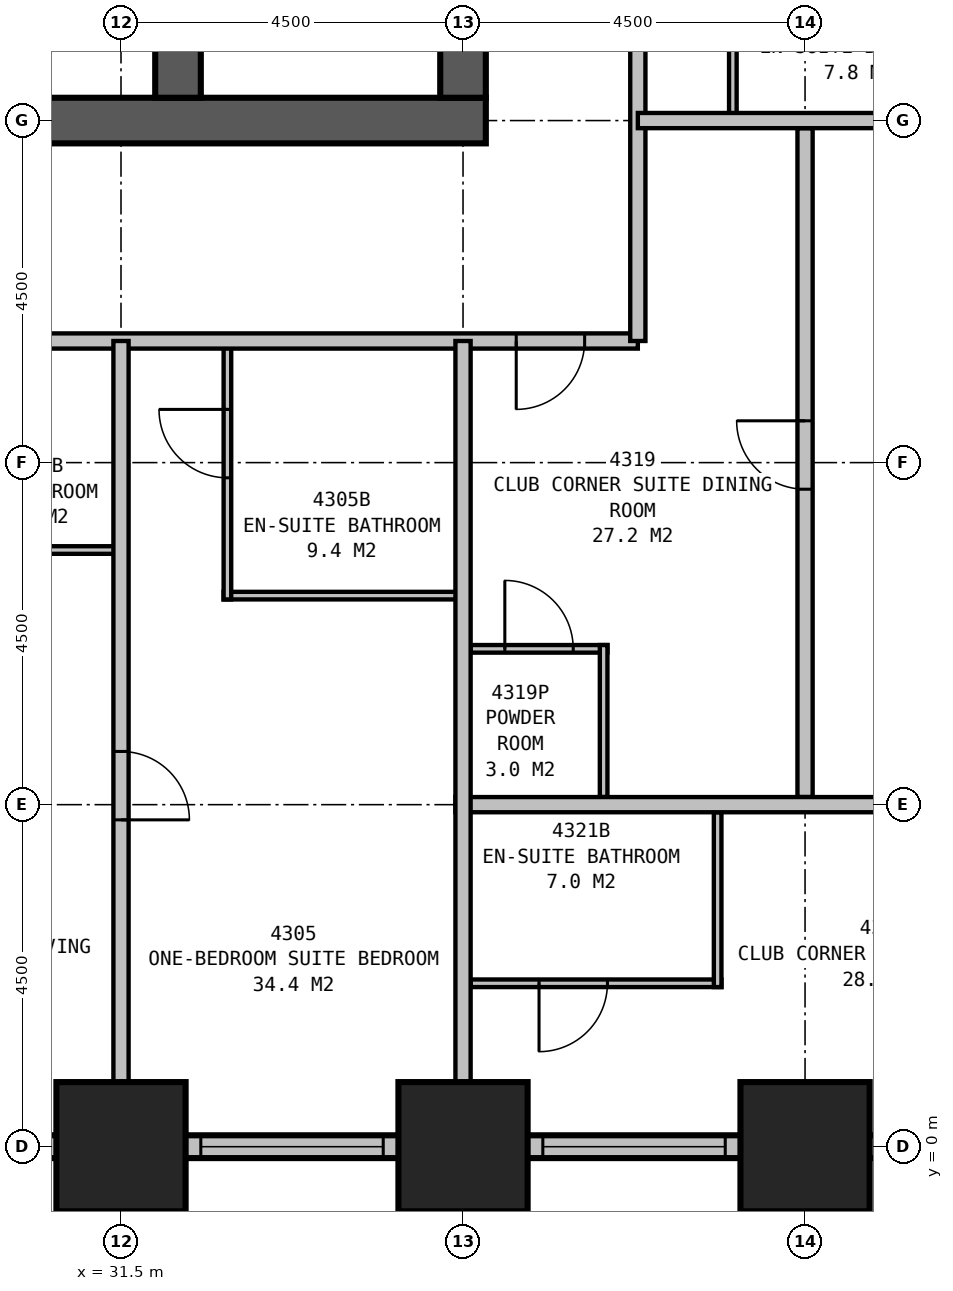
"""IFC4 building model, lengths in metres.
Left out: names, types, materials, properties, quantities, classifications, styles, units other than length and angle.
Written with IfcOpenShell. Run it as: python <this file> out.ifc"""

import sys

from ifc_helpers import new_model, si_unit, direction, frame, frame_2d, origin, origin_2d, place, context, subcontext, project, spatial, rectangle, extrude, element, fill, save


model = new_model("IFC4")
c1 = context("Model", 3, precision=1e-05, world=origin(), true_north=direction((0.0, 1.0)))
c2 = subcontext(c1, "Body", "Model", "MODEL_VIEW")
j1 = project(units=[si_unit("LENGTHUNIT", "METRE"), si_unit("PLANEANGLEUNIT", "RADIAN")], contexts=[c1])
p1 = place(None, origin())
s1 = spatial("IfcSite", under=j1, at=p1, CompositionType="ELEMENT")
p2 = place(p1, origin())
s2 = spatial("IfcBuilding", under=s1, at=p2, CompositionType="ELEMENT")
p3 = place(p2, frame((0.0, 0.0, 169.4)))
s3 = spatial("IfcBuildingStorey", under=s2, at=p3, CompositionType="ELEMENT", Elevation=169.4)
for number, where, z_axis, x_axis in (
    (1, (31.5, 0.0, 0.0), (0.0, 0.0, 1.0), (1.0, 0.0, 0.0)),
    (2, (36.0, 0.0, 0.0), (0.0, 0.0, 1.0), (1.0, 0.0, 0.0)),
    (3, (40.5, 0.0, 0.0), (0.0, 0.0, 1.0), (1.0, 0.0, 0.0)),
):
    element("IfcColumn", number, at=place(p3, frame(where, z_axis=z_axis, x_axis=x_axis)), inside=s3, PredefinedType="COLUMN", context=c2, shape_type="SweptSolid", body=[
        extrude(rectangle(XDim=1.7, YDim=1.7, at=origin_2d()), origin(), (0.0, 0.0, 1.0), 3.5),
    ])
p4 = place(p3, frame((13.2, 13.5, 0.0), z_axis=(0.0, 0.0, 1.0), x_axis=(1.0, 0.0, 0.0)))
e4 = element("IfcWall", 4, at=p4, inside=s3, PredefinedType="SHEAR", context=c2, shape_type="SweptSolid", body=[
    extrude(rectangle(XDim=23.1, YDim=0.6, at=frame_2d((11.55, 0.0))), origin(), (0.0, 0.0, 1.0), 3.5),
])
p5 = place(p3, frame((32.25, 13.8, 0.0), z_axis=(0.0, 0.0, 1.0), x_axis=(0.0, 1.0, 0.0)))
e5 = element("IfcWall", 5, at=p5, inside=s3, PredefinedType="SHEAR", context=c2, shape_type="SweptSolid", body=[
    extrude(rectangle(XDim=12.9, YDim=0.6, at=frame_2d((6.45, 0.0))), origin(), (0.0, 0.0, 1.0), 3.5),
])
p6 = place(p5, frame((5.05, 0.0, 0.0), z_axis=(0.0, 0.0, 1.0), x_axis=(-1.0, 0.0, 0.0)))
e6 = element("IfcOpeningElement", 6, at=p6, cuts=e5, PredefinedType="OPENING", context=c2, shape_type="SweptSolid", body=[
    extrude(rectangle(XDim=1.2, YDim=2.1, at=frame_2d((0.6, 1.05))), frame((0.0, 0.31, 0.0), z_axis=(0.0, -1.0, 0.0), x_axis=(1.0, 0.0, 0.0)), (0.0, 0.0, 1.0), 0.62),
])
p7 = place(p3, frame((36.0, 13.8, 0.0), z_axis=(0.0, 0.0, 1.0), x_axis=(0.0, 1.0, 0.0)))
e7 = element("IfcWall", 7, at=p7, inside=s3, PredefinedType="SHEAR", context=c2, shape_type="SweptSolid", body=[
    extrude(rectangle(XDim=2.7, YDim=0.6, at=frame_2d((1.35, 0.0))), origin(), (0.0, 0.0, 1.0), 3.5),
])
p8 = place(p3, frame((8.85, 0.0, 0.0), z_axis=(0.0, 0.0, 1.0), x_axis=(1.0, 0.0, 0.0)))
e8 = element("IfcWall", 8, at=p8, inside=s3, PredefinedType="STANDARD", context=c2, shape_type="SweptSolid", body=[
    extrude(rectangle(XDim=36.3, YDim=0.3, at=frame_2d((18.15, 0.0))), origin(), (0.0, 0.0, 1.0), 2.25),
])
p9 = place(p8, frame((1.2, 0.0, 0.5)))
e9 = element("IfcOpeningElement", 9, at=p9, cuts=e8, PredefinedType="OPENING", context=c2, shape_type="SweptSolid", body=[
    extrude(rectangle(XDim=2.4, YDim=1.6, at=frame_2d((1.2, 0.8))), frame((0.0, 0.16, 0.0), z_axis=(0.0, -1.0, 0.0), x_axis=(1.0, 0.0, 0.0)), (0.0, 0.0, 1.0), 0.32),
])
p10 = place(p8, frame((5.7, 0.0, 0.5)))
e10 = element("IfcOpeningElement", 10, at=p10, cuts=e8, PredefinedType="OPENING", context=c2, shape_type="SweptSolid", body=[
    extrude(rectangle(XDim=2.4, YDim=1.6, at=frame_2d((1.2, 0.8))), frame((0.0, 0.16, 0.0), z_axis=(0.0, -1.0, 0.0), x_axis=(1.0, 0.0, 0.0)), (0.0, 0.0, 1.0), 0.32),
])
p11 = place(p8, frame((10.2, 0.0, 0.5)))
e11 = element("IfcOpeningElement", 11, at=p11, cuts=e8, PredefinedType="OPENING", context=c2, shape_type="SweptSolid", body=[
    extrude(rectangle(XDim=2.4, YDim=1.6, at=frame_2d((1.2, 0.8))), frame((0.0, 0.16, 0.0), z_axis=(0.0, -1.0, 0.0), x_axis=(1.0, 0.0, 0.0)), (0.0, 0.0, 1.0), 0.32),
])
p12 = place(p8, frame((14.7, 0.0, 0.5)))
e12 = element("IfcOpeningElement", 12, at=p12, cuts=e8, PredefinedType="OPENING", context=c2, shape_type="SweptSolid", body=[
    extrude(rectangle(XDim=2.4, YDim=1.6, at=frame_2d((1.2, 0.8))), frame((0.0, 0.16, 0.0), z_axis=(0.0, -1.0, 0.0), x_axis=(1.0, 0.0, 0.0)), (0.0, 0.0, 1.0), 0.32),
])
p13 = place(p8, frame((19.2, 0.0, 0.5)))
e13 = element("IfcOpeningElement", 13, at=p13, cuts=e8, PredefinedType="OPENING", context=c2, shape_type="SweptSolid", body=[
    extrude(rectangle(XDim=2.4, YDim=1.6, at=frame_2d((1.2, 0.8))), frame((0.0, 0.16, 0.0), z_axis=(0.0, -1.0, 0.0), x_axis=(1.0, 0.0, 0.0)), (0.0, 0.0, 1.0), 0.32),
])
p14 = place(p8, frame((23.7, 0.0, 0.5)))
e14 = element("IfcOpeningElement", 14, at=p14, cuts=e8, PredefinedType="OPENING", context=c2, shape_type="SweptSolid", body=[
    extrude(rectangle(XDim=2.4, YDim=1.6, at=frame_2d((1.2, 0.8))), frame((0.0, 0.16, 0.0), z_axis=(0.0, -1.0, 0.0), x_axis=(1.0, 0.0, 0.0)), (0.0, 0.0, 1.0), 0.32),
])
p15 = place(p8, frame((28.2, 0.0, 0.5)))
e15 = element("IfcOpeningElement", 15, at=p15, cuts=e8, PredefinedType="OPENING", context=c2, shape_type="SweptSolid", body=[
    extrude(rectangle(XDim=2.4, YDim=1.6, at=frame_2d((1.2, 0.8))), frame((0.0, 0.16, 0.0), z_axis=(0.0, -1.0, 0.0), x_axis=(1.0, 0.0, 0.0)), (0.0, 0.0, 1.0), 0.32),
])
p16 = place(p8, frame((32.7, 0.0, 0.5)))
e16 = element("IfcOpeningElement", 16, at=p16, cuts=e8, PredefinedType="OPENING", context=c2, shape_type="SweptSolid", body=[
    extrude(rectangle(XDim=2.4, YDim=1.6, at=frame_2d((1.2, 0.8))), frame((0.0, 0.16, 0.0), z_axis=(0.0, -1.0, 0.0), x_axis=(1.0, 0.0, 0.0)), (0.0, 0.0, 1.0), 0.32),
])
p17 = place(p3, frame((11.2, 10.6, 0.0), z_axis=(0.0, 0.0, 1.0), x_axis=(1.0, 0.0, 0.0)))
e17 = element("IfcWall", 17, at=p17, inside=s3, PredefinedType="PARTITIONING", context=c2, shape_type="SweptSolid", body=[
    extrude(rectangle(XDim=27.1, YDim=0.2, at=frame_2d((13.55, 0.0))), origin(), (0.0, 0.0, 1.0), 3.25),
])
p18 = place(p17, frame((4.05, 0.0, 0.0), z_axis=(0.0, 0.0, 1.0), x_axis=(-1.0, 0.0, 0.0)))
e18 = element("IfcOpeningElement", 18, at=p18, cuts=e17, PredefinedType="OPENING", context=c2, shape_type="SweptSolid", body=[
    extrude(rectangle(XDim=0.9, YDim=2.1, at=frame_2d((0.45, 1.05))), frame((0.0, 0.11, 0.0), z_axis=(0.0, -1.0, 0.0), x_axis=(1.0, 0.0, 0.0)), (0.0, 0.0, 1.0), 0.22),
])
p19 = place(p17, frame((12.65, 0.0, 0.0), z_axis=(0.0, 0.0, 1.0), x_axis=(-1.0, 0.0, 0.0)))
e19 = element("IfcOpeningElement", 19, at=p19, cuts=e17, PredefinedType="OPENING", context=c2, shape_type="SweptSolid", body=[
    extrude(rectangle(XDim=1.0, YDim=2.1, at=frame_2d((0.5, 1.05))), frame((0.0, 0.11, 0.0), z_axis=(0.0, -1.0, 0.0), x_axis=(1.0, 0.0, 0.0)), (0.0, 0.0, 1.0), 0.22),
])
p20 = place(p17, frame((17.55, 0.0, 0.0), z_axis=(0.0, 0.0, 1.0), x_axis=(-1.0, 0.0, 0.0)))
e20 = element("IfcOpeningElement", 20, at=p20, cuts=e17, PredefinedType="OPENING", context=c2, shape_type="SweptSolid", body=[
    extrude(rectangle(XDim=0.9, YDim=2.1, at=frame_2d((0.45, 1.05))), frame((0.0, 0.11, 0.0), z_axis=(0.0, -1.0, 0.0), x_axis=(1.0, 0.0, 0.0)), (0.0, 0.0, 1.0), 0.22),
])
p21 = place(p17, frame((1.6, 0.0, 0.0), z_axis=(0.0, 0.0, 1.0), x_axis=(-1.0, 0.0, 0.0)))
e21 = element("IfcOpeningElement", 21, at=p21, cuts=e17, PredefinedType="OPENING", context=c2, shape_type="SweptSolid", body=[
    extrude(rectangle(XDim=0.9, YDim=2.1, at=frame_2d((0.45, 1.05))), frame((0.0, 0.11, 0.0), z_axis=(0.0, -1.0, 0.0), x_axis=(1.0, 0.0, 0.0)), (0.0, 0.0, 1.0), 0.22),
])
p22 = place(p17, frame((26.4, 0.0, 0.0), z_axis=(0.0, 0.0, 1.0), x_axis=(-1.0, 0.0, 0.0)))
e22 = element("IfcOpeningElement", 22, at=p22, cuts=e17, PredefinedType="OPENING", context=c2, shape_type="SweptSolid", body=[
    extrude(rectangle(XDim=0.9, YDim=2.1, at=frame_2d((0.45, 1.05))), frame((0.0, 0.11, 0.0), z_axis=(0.0, -1.0, 0.0), x_axis=(1.0, 0.0, 0.0)), (0.0, 0.0, 1.0), 0.22),
])
p23 = place(p3, frame((38.3, 10.6, 0.0), z_axis=(0.0, 0.0, 1.0), x_axis=(0.0, 1.0, 0.0)))
e23 = element("IfcWall", 23, at=p23, inside=s3, PredefinedType="PARTITIONING", context=c2, shape_type="SweptSolid", body=[
    extrude(rectangle(XDim=18.7, YDim=0.2, at=frame_2d((9.35, 0.0))), origin(), (0.0, 0.0, 1.0), 3.25),
])
p24 = place(p23, frame((6.95, 0.0, 0.0), z_axis=(0.0, 0.0, 1.0), x_axis=(-1.0, 0.0, 0.0)))
e24 = element("IfcOpeningElement", 24, at=p24, cuts=e23, PredefinedType="OPENING", context=c2, shape_type="SweptSolid", body=[
    extrude(rectangle(XDim=0.9, YDim=2.1, at=frame_2d((0.45, 1.05))), frame((0.0, 0.11, 0.0), z_axis=(0.0, -1.0, 0.0), x_axis=(1.0, 0.0, 0.0)), (0.0, 0.0, 1.0), 0.22),
])
p25 = place(p23, frame((11.05, 0.0, 0.0), z_axis=(0.0, 0.0, 1.0), x_axis=(-1.0, 0.0, 0.0)))
e25 = element("IfcOpeningElement", 25, at=p25, cuts=e23, PredefinedType="OPENING", context=c2, shape_type="SweptSolid", body=[
    extrude(rectangle(XDim=0.9, YDim=2.1, at=frame_2d((0.45, 1.05))), frame((0.0, 0.11, 0.0), z_axis=(0.0, -1.0, 0.0), x_axis=(1.0, 0.0, 0.0)), (0.0, 0.0, 1.0), 0.22),
])
p26 = place(p3, frame((31.5, 10.6, 0.0), z_axis=(0.0, 0.0, 1.0), x_axis=(0.0, -1.0, 0.0)))
e26 = element("IfcWall", 26, at=p26, inside=s3, PredefinedType="PARTITIONING", context=c2, shape_type="SweptSolid", body=[
    extrude(rectangle(XDim=10.6, YDim=0.2, at=frame_2d((5.3, 0.0))), origin(), (0.0, 0.0, 1.0), 2.25),
])
p27 = place(p26, frame((5.4, 0.0, 0.0)))
e27 = element("IfcOpeningElement", 27, at=p27, cuts=e26, PredefinedType="OPENING", context=c2, shape_type="SweptSolid", body=[
    extrude(rectangle(XDim=0.9, YDim=2.1, at=frame_2d((0.45, 1.05))), frame((0.0, 0.11, 0.0), z_axis=(0.0, -1.0, 0.0), x_axis=(1.0, 0.0, 0.0)), (0.0, 0.0, 1.0), 0.22),
])
p28 = place(p3, frame((29.1, 7.85, 0.0), z_axis=(0.0, 0.0, 1.0), x_axis=(1.0, 0.0, 0.0)))
e28 = element("IfcWall", 28, at=p28, inside=s3, PredefinedType="PLUMBINGWALL", context=c2, shape_type="SweptSolid", body=[
    extrude(rectangle(XDim=2.4, YDim=0.1, at=frame_2d((1.2, 0.0))), origin(), (0.0, 0.0, 1.0), 3.25),
])
p29 = place(p3, frame((32.85, 7.25, 0.0), z_axis=(0.0, 0.0, 1.0), x_axis=(1.0, 0.0, 0.0)))
e29 = element("IfcWall", 29, at=p29, inside=s3, PredefinedType="PLUMBINGWALL", context=c2, shape_type="SweptSolid", body=[
    extrude(rectangle(XDim=3.15, YDim=0.1, at=frame_2d((1.575, 0.0))), origin(), (0.0, 0.0, 1.0), 3.25),
])
p30 = place(p3, frame((32.9, 10.6, 0.0), z_axis=(0.0, 0.0, 1.0), x_axis=(0.0, -1.0, 0.0)))
e30 = element("IfcWall", 30, at=p30, inside=s3, PredefinedType="PLUMBINGWALL", context=c2, shape_type="SweptSolid", body=[
    extrude(rectangle(XDim=3.4, YDim=0.1, at=frame_2d((1.7, 0.0))), origin(), (0.0, 0.0, 1.0), 3.25),
])
p31 = place(p30, frame((1.8, 0.0, 0.0), z_axis=(0.0, 0.0, 1.0), x_axis=(-1.0, 0.0, 0.0)))
e31 = element("IfcOpeningElement", 31, at=p31, cuts=e30, PredefinedType="OPENING", context=c2, shape_type="SweptSolid", body=[
    extrude(rectangle(XDim=0.9, YDim=2.1, at=frame_2d((0.45, 1.05))), frame((0.0, 0.06, 0.0), z_axis=(0.0, -1.0, 0.0), x_axis=(1.0, 0.0, 0.0)), (0.0, 0.0, 1.0), 0.12),
])
p32 = place(p3, frame((39.55, 13.5, 0.0), z_axis=(0.0, 0.0, 1.0), x_axis=(0.0, 1.0, 0.0)))
e32 = element("IfcWall", 32, at=p32, inside=s3, PredefinedType="PLUMBINGWALL", context=c2, shape_type="SweptSolid", body=[
    extrude(rectangle(XDim=2.8, YDim=0.1, at=frame_2d((1.4, 0.0))), origin(), (0.0, 0.0, 1.0), 3.25),
])
p33 = place(p3, frame((38.3, 13.5, 0.0), z_axis=(0.0, 0.0, 1.0), x_axis=(1.0, 0.0, 0.0)))
e33 = element("IfcWall", 33, at=p33, inside=s3, PredefinedType="PARTITIONING", context=c2, shape_type="SweptSolid", body=[
    extrude(rectangle(XDim=9.921, YDim=0.2, at=frame_2d((4.96, 0.0))), origin(), (0.0, 0.0, 1.0), 1.95),
])
p34 = place(p3, frame((36.0, 10.6, 0.0), z_axis=(0.0, 0.0, 1.0), x_axis=(0.0, -1.0, 0.0)))
e34 = element("IfcWall", 34, at=p34, inside=s3, PredefinedType="PARTITIONING", context=c2, shape_type="SweptSolid", body=[
    extrude(rectangle(XDim=10.6, YDim=0.2, at=frame_2d((5.3, 0.0))), origin(), (0.0, 0.0, 1.0), 2.25),
])
p35 = place(p3, frame((35.9, 4.5, 0.0), z_axis=(0.0, 0.0, 1.0), x_axis=(1.0, 0.0, 0.0)))
e35 = element("IfcWall", 35, at=p35, inside=s3, PredefinedType="PARTITIONING", context=c2, shape_type="SweptSolid", body=[
    extrude(rectangle(XDim=9.1, YDim=0.2, at=frame_2d((4.55, 0.0))), origin(), (0.0, 0.0, 1.0), 3.25),
])
p36 = place(p35, frame((7.1, 0.0, 0.0)))
e36 = element("IfcOpeningElement", 36, at=p36, cuts=e35, PredefinedType="OPENING", context=c2, shape_type="SweptSolid", body=[
    extrude(rectangle(XDim=0.9, YDim=2.1, at=frame_2d((0.45, 1.05))), frame((0.0, 0.11, 0.0), z_axis=(0.0, -1.0, 0.0), x_axis=(1.0, 0.0, 0.0)), (0.0, 0.0, 1.0), 0.22),
])
p37 = place(p3, frame((40.5, 4.6, 0.0), z_axis=(0.0, 0.0, 1.0), x_axis=(0.0, 1.0, 0.0)))
e37 = element("IfcWall", 37, at=p37, inside=s3, PredefinedType="PARTITIONING", context=c2, shape_type="SweptSolid", body=[
    extrude(rectangle(XDim=8.8, YDim=0.2, at=frame_2d((4.4, 0.0))), origin(), (0.0, 0.0, 1.0), 2.25),
])
p38 = place(p37, frame((4.05, 0.0, 0.0)))
e38 = element("IfcOpeningElement", 38, at=p38, cuts=e37, PredefinedType="OPENING", context=c2, shape_type="SweptSolid", body=[
    extrude(rectangle(XDim=0.9, YDim=2.1, at=frame_2d((0.45, 1.05))), frame((0.0, 0.11, 0.0), z_axis=(0.0, -1.0, 0.0), x_axis=(1.0, 0.0, 0.0)), (0.0, 0.0, 1.0), 0.22),
])
p39 = place(p3, frame((37.85, 4.6, 0.0), z_axis=(0.0, 0.0, 1.0), x_axis=(0.0, 1.0, 0.0)))
e39 = element("IfcWall", 39, at=p39, inside=s3, PredefinedType="PLUMBINGWALL", context=c2, shape_type="SweptSolid", body=[
    extrude(rectangle(XDim=2.0, YDim=0.1, at=frame_2d((1.0, 0.0))), origin(), (0.0, 0.0, 1.0), 3.25),
])
p40 = place(p3, frame((36.1, 6.55, 0.0), z_axis=(0.0, 0.0, 1.0), x_axis=(1.0, 0.0, 0.0)))
e40 = element("IfcWall", 40, at=p40, inside=s3, PredefinedType="PLUMBINGWALL", context=c2, shape_type="SweptSolid", body=[
    extrude(rectangle(XDim=1.8, YDim=0.1, at=frame_2d((0.9, 0.0))), origin(), (0.0, 0.0, 1.0), 3.25),
])
p41 = place(p40, frame((0.45, 0.0, 0.0)))
e41 = element("IfcOpeningElement", 41, at=p41, cuts=e40, PredefinedType="OPENING", context=c2, shape_type="SweptSolid", body=[
    extrude(rectangle(XDim=0.9, YDim=2.1, at=frame_2d((0.45, 1.05))), frame((0.0, 0.06, 0.0), z_axis=(0.0, -1.0, 0.0), x_axis=(1.0, 0.0, 0.0)), (0.0, 0.0, 1.0), 0.12),
])
p42 = place(p3, frame((39.35, 4.4, 0.0), z_axis=(0.0, 0.0, 1.0), x_axis=(0.0, -1.0, 0.0)))
e42 = element("IfcWall", 42, at=p42, inside=s3, PredefinedType="PLUMBINGWALL", context=c2, shape_type="SweptSolid", body=[
    extrude(rectangle(XDim=2.3, YDim=0.1, at=frame_2d((1.15, 0.0))), origin(), (0.0, 0.0, 1.0), 3.25),
])
p43 = place(p3, frame((36.1, 2.15, 0.0), z_axis=(0.0, 0.0, 1.0), x_axis=(1.0, 0.0, 0.0)))
e43 = element("IfcWall", 43, at=p43, inside=s3, PredefinedType="PLUMBINGWALL", context=c2, shape_type="SweptSolid", body=[
    extrude(rectangle(XDim=3.3, YDim=0.1, at=frame_2d((1.65, 0.0))), origin(), (0.0, 0.0, 1.0), 3.25),
])
p44 = place(p43, frame((1.8, 0.0, 0.0), z_axis=(0.0, 0.0, 1.0), x_axis=(-1.0, 0.0, 0.0)))
e44 = element("IfcOpeningElement", 44, at=p44, cuts=e43, PredefinedType="OPENING", context=c2, shape_type="SweptSolid", body=[
    extrude(rectangle(XDim=0.9, YDim=2.1, at=frame_2d((0.45, 1.05))), frame((0.0, 0.06, 0.0), z_axis=(0.0, -1.0, 0.0), x_axis=(1.0, 0.0, 0.0)), (0.0, 0.0, 1.0), 0.12),
])
p45 = place(p14, origin())
e45 = element("IfcWindow", 45, at=p45, inside=s3, PartitioningType="SINGLE_PANEL", PredefinedType="WINDOW", context=c2, shape_type="SweptSolid", body=[
    extrude(rectangle(XDim=2.4, YDim=1.6, at=frame_2d((1.2, 0.8))), frame((0.0, 0.03, 0.0), z_axis=(0.0, -1.0, 0.0), x_axis=(1.0, 0.0, 0.0)), (0.0, 0.0, 1.0), 0.06),
])
fill(e14, e45)
p46 = place(p15, origin())
e46 = element("IfcWindow", 46, at=p46, inside=s3, PartitioningType="SINGLE_PANEL", PredefinedType="WINDOW", context=c2, shape_type="SweptSolid", body=[
    extrude(rectangle(XDim=2.4, YDim=1.6, at=frame_2d((1.2, 0.8))), frame((0.0, 0.03, 0.0), z_axis=(0.0, -1.0, 0.0), x_axis=(1.0, 0.0, 0.0)), (0.0, 0.0, 1.0), 0.06),
])
fill(e15, e46)
p47 = place(p22, origin())
e47 = element("IfcDoor", 47, at=p47, inside=s3, OperationType="SINGLE_SWING_RIGHT", PredefinedType="DOOR", context=c2, shape_type="SweptSolid", body=[
    extrude(rectangle(XDim=0.9, YDim=2.1, at=frame_2d((0.45, 1.05))), frame((0.0, 0.025, 0.0), z_axis=(0.0, -1.0, 0.0), x_axis=(1.0, 0.0, 0.0)), (0.0, 0.0, 1.0), 0.05),
])
fill(e22, e47)
p48 = place(p27, origin())
e48 = element("IfcDoor", 48, at=p48, inside=s3, OperationType="SINGLE_SWING_RIGHT", PredefinedType="DOOR", context=c2, shape_type="SweptSolid", body=[
    extrude(rectangle(XDim=0.9, YDim=2.1, at=frame_2d((0.45, 1.05))), frame((0.0, 0.025, 0.0), z_axis=(0.0, -1.0, 0.0), x_axis=(1.0, 0.0, 0.0)), (0.0, 0.0, 1.0), 0.05),
])
fill(e27, e48)
p49 = place(p31, origin())
e49 = element("IfcDoor", 49, at=p49, inside=s3, OperationType="SINGLE_SWING_RIGHT", PredefinedType="DOOR", context=c2, shape_type="SweptSolid", body=[
    extrude(rectangle(XDim=0.9, YDim=2.1, at=frame_2d((0.45, 1.05))), frame((0.0, 0.025, 0.0), z_axis=(0.0, -1.0, 0.0), x_axis=(1.0, 0.0, 0.0)), (0.0, 0.0, 1.0), 0.05),
])
fill(e31, e49)
p50 = place(p38, origin())
e50 = element("IfcDoor", 50, at=p50, inside=s3, OperationType="SINGLE_SWING_RIGHT", PredefinedType="DOOR", context=c2, shape_type="SweptSolid", body=[
    extrude(rectangle(XDim=0.9, YDim=2.1, at=frame_2d((0.45, 1.05))), frame((0.0, 0.025, 0.0), z_axis=(0.0, -1.0, 0.0), x_axis=(1.0, 0.0, 0.0)), (0.0, 0.0, 1.0), 0.05),
])
fill(e38, e50)
p51 = place(p41, origin())
e51 = element("IfcDoor", 51, at=p51, inside=s3, OperationType="SINGLE_SWING_LEFT", PredefinedType="DOOR", context=c2, shape_type="SweptSolid", body=[
    extrude(rectangle(XDim=0.9, YDim=2.1, at=frame_2d((0.45, 1.05))), frame((0.0, 0.025, 0.0), z_axis=(0.0, -1.0, 0.0), x_axis=(1.0, 0.0, 0.0)), (0.0, 0.0, 1.0), 0.05),
])
fill(e41, e51)
p52 = place(p44, origin())
e52 = element("IfcDoor", 52, at=p52, inside=s3, OperationType="SINGLE_SWING_RIGHT", PredefinedType="DOOR", context=c2, shape_type="SweptSolid", body=[
    extrude(rectangle(XDim=0.9, YDim=2.1, at=frame_2d((0.45, 1.05))), frame((0.0, 0.025, 0.0), z_axis=(0.0, -1.0, 0.0), x_axis=(1.0, 0.0, 0.0)), (0.0, 0.0, 1.0), 0.05),
])
fill(e44, e52)
save(model, sys.argv[1])
